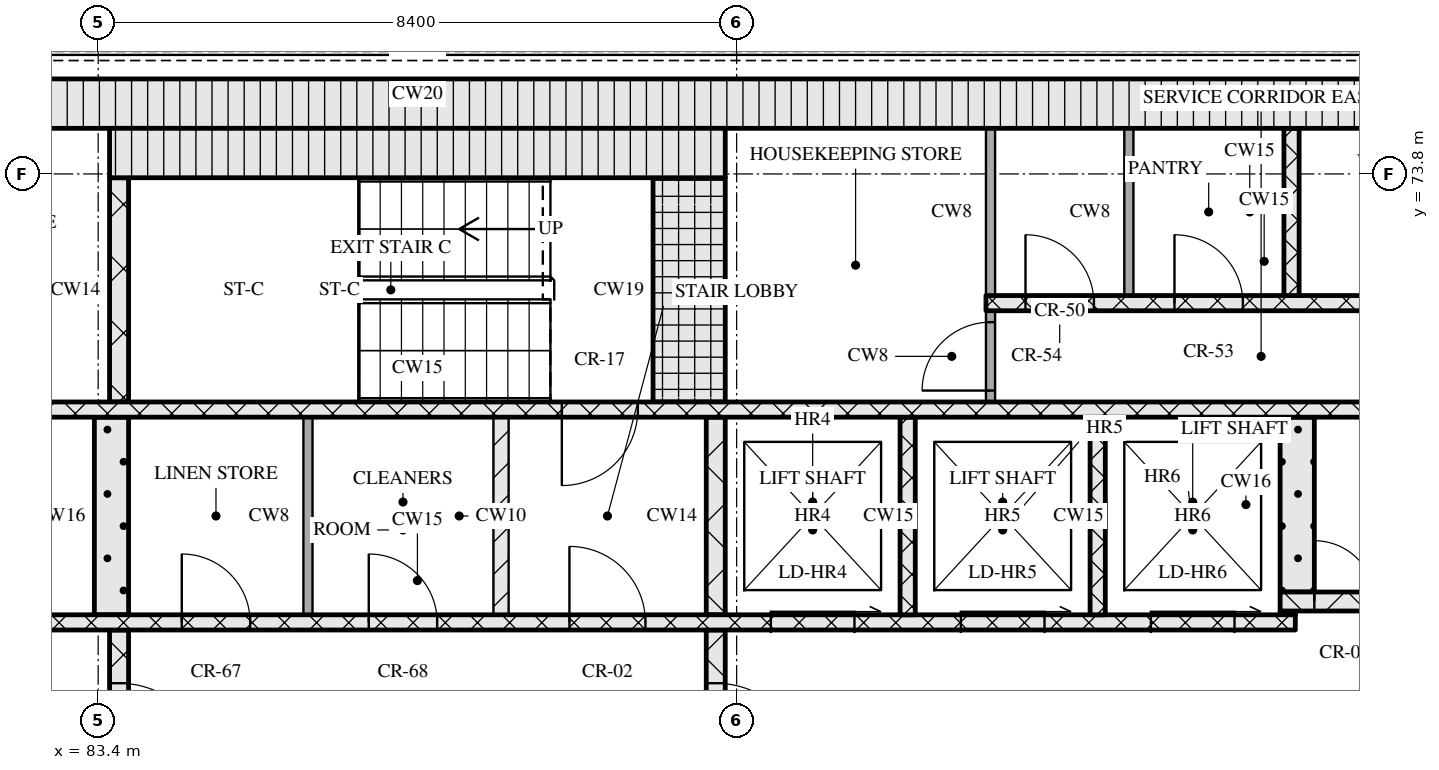
"""IFC4 building model, lengths in metres.
Left out: names, types, materials, properties, quantities, classifications, styles, units other than length and angle.
Written with IfcOpenShell. Run it as: python <this file> out.ifc"""

import sys

from ifc_helpers import new_model, si_unit, direction, frame, frame_2d, origin, place, context, subcontext, project, spatial, rectangle, extrude, element, fill, save


model = new_model("IFC4")
c1 = context("Model", 3, precision=1e-05, world=origin(), true_north=direction((0.0, 1.0)))
c2 = subcontext(c1, "Body", "Model", "MODEL_VIEW")
j1 = project(units=[si_unit("LENGTHUNIT", "METRE"), si_unit("PLANEANGLEUNIT", "RADIAN")], contexts=[c1])
p1 = place(None, origin())
s1 = spatial("IfcSite", under=j1, at=p1, CompositionType="ELEMENT")
p2 = place(p1, origin())
s2 = spatial("IfcBuilding", under=s1, at=p2, CompositionType="ELEMENT")
p3 = place(p2, frame((0.0, 0.0, 230.7)))
s3 = spatial("IfcBuildingStorey", under=s2, at=p3, CompositionType="ELEMENT", Elevation=230.7)
p4 = place(p3, frame((67.15, 74.725, 0.0), z_axis=(0.0, 0.0, 1.0), x_axis=(1.0, 0.0, 0.0)))
e1 = element("IfcWall", 1, at=p4, inside=s3, PredefinedType="SOLIDWALL", context=c2, shape_type="SweptSolid", body=[
    extrude(rectangle(XDim=40.9, YDim=0.65, at=frame_2d((20.45, 0.0))), origin(), (0.0, 0.0, 1.0), 3.32),
])
p5 = place(p3, frame((83.675, 65.2, 0.0), z_axis=(0.0, 0.0, 1.0), x_axis=(0.0, 1.0, 0.0)))
e2 = element("IfcWall", 2, at=p5, inside=s3, PredefinedType="SOLIDWALL", context=c2, shape_type="SweptSolid", body=[
    extrude(rectangle(XDim=2.6, YDim=0.25, at=frame_2d((1.3, 0.0))), origin(), (0.0, 0.0, 1.0), 3.32),
])
p6 = place(p5, frame((0.7, 0.0, 0.0)))
e3 = element("IfcOpeningElement", 3, at=p6, cuts=e2, PredefinedType="OPENING", context=c2, shape_type="SweptSolid", body=[
    extrude(rectangle(XDim=1.2, YDim=2.1, at=frame_2d((0.6, 1.05))), frame((0.0, 0.135, 0.0), z_axis=(0.0, -1.0, 0.0), x_axis=(1.0, 0.0, 0.0)), (0.0, 0.0, 1.0), 0.27),
])
p7 = place(p3, frame((91.525, 65.2, 0.0), z_axis=(0.0, 0.0, 1.0), x_axis=(0.0, 1.0, 0.0)))
e4 = element("IfcWall", 4, at=p7, inside=s3, PredefinedType="SOLIDWALL", context=c2, shape_type="SweptSolid", body=[
    extrude(rectangle(XDim=2.6, YDim=0.25, at=frame_2d((1.3, 0.0))), origin(), (0.0, 0.0, 1.0), 3.32),
])
p8 = place(p7, frame((0.7, 0.0, 0.0)))
e5 = element("IfcOpeningElement", 5, at=p8, cuts=e4, PredefinedType="OPENING", context=c2, shape_type="SweptSolid", body=[
    extrude(rectangle(XDim=1.2, YDim=2.1, at=frame_2d((0.6, 1.05))), frame((0.0, 0.135, 0.0), z_axis=(0.0, -1.0, 0.0), x_axis=(1.0, 0.0, 0.0)), (0.0, 0.0, 1.0), 0.27),
])
p9 = place(p3, frame((76.05, 67.9, 0.0), z_axis=(0.0, 0.0, 1.0), x_axis=(1.0, 0.0, 0.0)))
e6 = element("IfcWall", 6, at=p9, inside=s3, PredefinedType="SOLIDWALL", context=c2, shape_type="SweptSolid", body=[
    extrude(rectangle(XDim=23.1, YDim=0.2, at=frame_2d((11.55, 0.0))), origin(), (0.0, 0.0, 1.0), 3.32),
])
p10 = place(p9, frame((1.35, 0.0, 0.0)))
e7 = element("IfcOpeningElement", 7, at=p10, cuts=e6, PredefinedType="OPENING", context=c2, shape_type="SweptSolid", body=[
    extrude(rectangle(XDim=0.9, YDim=2.1, at=frame_2d((0.45, 1.05))), frame((0.0, 0.11, 0.0), z_axis=(0.0, -1.0, 0.0), x_axis=(1.0, 0.0, 0.0)), (0.0, 0.0, 1.0), 0.22),
])
p11 = place(p9, frame((5.06, 0.0, 0.0)))
e8 = element("IfcOpeningElement", 8, at=p11, cuts=e6, PredefinedType="OPENING", context=c2, shape_type="SweptSolid", body=[
    extrude(rectangle(XDim=0.9, YDim=2.1, at=frame_2d((0.45, 1.05))), frame((0.0, 0.11, 0.0), z_axis=(0.0, -1.0, 0.0), x_axis=(1.0, 0.0, 0.0)), (0.0, 0.0, 1.0), 0.22),
])
p12 = place(p9, frame((8.45, 0.0, 0.0)))
e9 = element("IfcOpeningElement", 9, at=p12, cuts=e6, PredefinedType="OPENING", context=c2, shape_type="SweptSolid", body=[
    extrude(rectangle(XDim=0.9, YDim=2.1, at=frame_2d((0.45, 1.05))), frame((0.0, 0.11, 0.0), z_axis=(0.0, -1.0, 0.0), x_axis=(1.0, 0.0, 0.0)), (0.0, 0.0, 1.0), 0.22),
])
p13 = place(p9, frame((10.91, 0.0, 0.0)))
e10 = element("IfcOpeningElement", 10, at=p13, cuts=e6, PredefinedType="OPENING", context=c2, shape_type="SweptSolid", body=[
    extrude(rectangle(XDim=0.9, YDim=2.1, at=frame_2d((0.45, 1.05))), frame((0.0, 0.11, 0.0), z_axis=(0.0, -1.0, 0.0), x_axis=(1.0, 0.0, 0.0)), (0.0, 0.0, 1.0), 0.22),
])
p14 = place(p9, frame((13.55, 0.0, 0.0)))
e11 = element("IfcOpeningElement", 11, at=p14, cuts=e6, PredefinedType="OPENING", context=c2, shape_type="SweptSolid", body=[
    extrude(rectangle(XDim=1.0, YDim=2.1, at=frame_2d((0.5, 1.05))), frame((0.0, 0.11, 0.0), z_axis=(0.0, -1.0, 0.0), x_axis=(1.0, 0.0, 0.0)), (0.0, 0.0, 1.0), 0.22),
])
p15 = place(p9, frame((16.2, 0.0, 0.0)))
e12 = element("IfcOpeningElement", 12, at=p15, cuts=e6, PredefinedType="OPENING", context=c2, shape_type="SweptSolid", body=[
    extrude(rectangle(XDim=1.1, YDim=2.1, at=frame_2d((0.55, 1.05))), frame((0.0, 0.11, 0.0), z_axis=(0.0, -1.0, 0.0), x_axis=(1.0, 0.0, 0.0)), (0.0, 0.0, 1.0), 0.22),
])
p16 = place(p9, frame((18.7, 0.0, 0.0)))
e13 = element("IfcOpeningElement", 13, at=p16, cuts=e6, PredefinedType="OPENING", context=c2, shape_type="SweptSolid", body=[
    extrude(rectangle(XDim=1.1, YDim=2.1, at=frame_2d((0.55, 1.05))), frame((0.0, 0.11, 0.0), z_axis=(0.0, -1.0, 0.0), x_axis=(1.0, 0.0, 0.0)), (0.0, 0.0, 1.0), 0.22),
])
p17 = place(p9, frame((21.2, 0.0, 0.0)))
e14 = element("IfcOpeningElement", 14, at=p17, cuts=e6, PredefinedType="OPENING", context=c2, shape_type="SweptSolid", body=[
    extrude(rectangle(XDim=1.1, YDim=2.1, at=frame_2d((0.55, 1.05))), frame((0.0, 0.11, 0.0), z_axis=(0.0, -1.0, 0.0), x_axis=(1.0, 0.0, 0.0)), (0.0, 0.0, 1.0), 0.22),
])
p18 = place(p3, frame((83.575, 68.0, 0.0), z_axis=(0.0, 0.0, 1.0), x_axis=(0.0, 1.0, 0.0)))
e15 = element("IfcWall", 15, at=p18, inside=s3, PredefinedType="SOLIDWALL", context=c2, shape_type="SweptSolid", body=[
    extrude(rectangle(XDim=2.6, YDim=0.45, at=frame_2d((1.3, 0.0))), origin(), (0.0, 0.0, 1.0), 3.32),
])
p19 = place(p3, frame((86.16, 68.0, 0.0), z_axis=(0.0, 0.0, 1.0), x_axis=(0.0, 1.0, 0.0)))
e16 = element("IfcWall", 16, at=p19, inside=s3, PredefinedType="PARTITIONING", context=c2, shape_type="SweptSolid", body=[
    extrude(rectangle(XDim=2.6, YDim=0.12, at=frame_2d((1.3, 0.0))), origin(), (0.0, 0.0, 1.0), 3.32),
])
p20 = place(p3, frame((88.7, 68.0, 0.0), z_axis=(0.0, 0.0, 1.0), x_axis=(0.0, 1.0, 0.0)))
e17 = element("IfcWall", 17, at=p20, inside=s3, PredefinedType="PARTITIONING", context=c2, shape_type="SweptSolid", body=[
    extrude(rectangle(XDim=2.6, YDim=0.2, at=frame_2d((1.3, 0.0))), origin(), (0.0, 0.0, 1.0), 3.32),
])
p21 = place(p3, frame((91.525, 68.0, 0.0), z_axis=(0.0, 0.0, 1.0), x_axis=(0.0, 1.0, 0.0)))
e18 = element("IfcWall", 18, at=p21, inside=s3, PredefinedType="SOLIDWALL", context=c2, shape_type="SweptSolid", body=[
    extrude(rectangle(XDim=2.6, YDim=0.25, at=frame_2d((1.3, 0.0))), origin(), (0.0, 0.0, 1.0), 3.32),
])
for number, where, z_axis, x_axis in (
    (19, (94.05, 68.0, 0.0), (0.0, 0.0, 1.0), (0.0, 1.0, 0.0)),
    (20, (96.55, 68.0, 0.0), (0.0, 0.0, 1.0), (0.0, 1.0, 0.0)),
):
    element("IfcWall", number, at=place(p3, frame(where, z_axis=z_axis, x_axis=x_axis)), inside=s3, PredefinedType="SOLIDWALL", context=c2, shape_type="SweptSolid", body=[
        extrude(rectangle(XDim=2.6, YDim=0.2, at=frame_2d((1.3, 0.0))), origin(), (0.0, 0.0, 1.0), 3.32),
    ])
p22 = place(p3, frame((98.95, 68.025, 0.0), z_axis=(0.0, 0.0, 1.0), x_axis=(1.0, 0.0, 0.0)))
e21 = element("IfcWall", 21, at=p22, inside=s3, PredefinedType="SOLIDWALL", context=c2, shape_type="SweptSolid", body=[
    extrude(rectangle(XDim=0.2, YDim=0.05, at=frame_2d((0.1, 0.0))), origin(), (0.0, 0.0, 1.0), 3.32),
])
p23 = place(p3, frame((98.95, 68.175, 0.0), z_axis=(0.0, 0.0, 1.0), x_axis=(1.0, 0.0, 0.0)))
e22 = element("IfcWall", 22, at=p23, inside=s3, PredefinedType="SOLIDWALL", context=c2, shape_type="SweptSolid", body=[
    extrude(rectangle(XDim=8.45, YDim=0.25, at=frame_2d((4.225, 0.0))), origin(), (0.0, 0.0, 1.0), 3.32),
])
p24 = place(p23, frame((0.45, 0.0, 0.0)))
e23 = element("IfcOpeningElement", 23, at=p24, cuts=e22, PredefinedType="OPENING", context=c2, shape_type="SweptSolid", body=[
    extrude(rectangle(XDim=0.8, YDim=2.1, at=frame_2d((0.4, 1.05))), frame((0.0, 0.135, 0.0), z_axis=(0.0, -1.0, 0.0), x_axis=(1.0, 0.0, 0.0)), (0.0, 0.0, 1.0), 0.27),
])
p25 = place(p23, frame((1.75, 0.0, 0.0)))
e24 = element("IfcOpeningElement", 24, at=p25, cuts=e22, PredefinedType="OPENING", context=c2, shape_type="SweptSolid", body=[
    extrude(rectangle(XDim=1.0, YDim=2.1, at=frame_2d((0.5, 1.05))), frame((0.0, 0.135, 0.0), z_axis=(0.0, -1.0, 0.0), x_axis=(1.0, 0.0, 0.0)), (0.0, 0.0, 1.0), 0.27),
])
p26 = place(p3, frame((99.175, 68.3, 0.0), z_axis=(0.0, 0.0, 1.0), x_axis=(0.0, 1.0, 0.0)))
e25 = element("IfcWall", 25, at=p26, inside=s3, PredefinedType="SOLIDWALL", context=c2, shape_type="SweptSolid", body=[
    extrude(rectangle(XDim=2.3, YDim=0.45, at=frame_2d((1.15, 0.0))), origin(), (0.0, 0.0, 1.0), 3.32),
])
p27 = place(p3, frame((67.8, 70.7, 0.0), z_axis=(0.0, 0.0, 1.0), x_axis=(1.0, 0.0, 0.0)))
e26 = element("IfcWall", 26, at=p27, inside=s3, PredefinedType="SOLIDWALL", context=c2, shape_type="SweptSolid", body=[
    extrude(rectangle(XDim=39.6, YDim=0.2, at=frame_2d((19.8, 0.0))), origin(), (0.0, 0.0, 1.0), 3.32),
])
p28 = place(p27, frame((0.65, 0.0, 0.0)))
e27 = element("IfcOpeningElement", 27, at=p28, cuts=e26, PredefinedType="OPENING", context=c2, shape_type="SweptSolid", body=[
    extrude(rectangle(XDim=1.1, YDim=2.1, at=frame_2d((0.55, 1.05))), frame((0.0, 0.11, 0.0), z_axis=(0.0, -1.0, 0.0), x_axis=(1.0, 0.0, 0.0)), (0.0, 0.0, 1.0), 0.22),
])
p29 = place(p27, frame((3.25, 0.0, 0.0)))
e28 = element("IfcOpeningElement", 28, at=p29, cuts=e26, PredefinedType="OPENING", context=c2, shape_type="SweptSolid", body=[
    extrude(rectangle(XDim=1.1, YDim=2.1, at=frame_2d((0.55, 1.05))), frame((0.0, 0.11, 0.0), z_axis=(0.0, -1.0, 0.0), x_axis=(1.0, 0.0, 0.0)), (0.0, 0.0, 1.0), 0.22),
])
p30 = place(p27, frame((5.9, 0.0, 0.0)))
e29 = element("IfcOpeningElement", 29, at=p30, cuts=e26, PredefinedType="OPENING", context=c2, shape_type="SweptSolid", body=[
    extrude(rectangle(XDim=1.0, YDim=2.1, at=frame_2d((0.5, 1.05))), frame((0.0, 0.11, 0.0), z_axis=(0.0, -1.0, 0.0), x_axis=(1.0, 0.0, 0.0)), (0.0, 0.0, 1.0), 0.22),
])
p31 = place(p27, frame((21.7, 0.0, 0.0)))
e30 = element("IfcOpeningElement", 30, at=p31, cuts=e26, PredefinedType="OPENING", context=c2, shape_type="SweptSolid", body=[
    extrude(rectangle(XDim=1.0, YDim=2.1, at=frame_2d((0.5, 1.05))), frame((0.0, 0.11, 0.0), z_axis=(0.0, -1.0, 0.0), x_axis=(1.0, 0.0, 0.0)), (0.0, 0.0, 1.0), 0.22),
])
p32 = place(p27, frame((32.7, 0.0, 0.0)))
e31 = element("IfcOpeningElement", 31, at=p32, cuts=e26, PredefinedType="OPENING", context=c2, shape_type="SweptSolid", body=[
    extrude(rectangle(XDim=1.0, YDim=2.1, at=frame_2d((0.5, 1.05))), frame((0.0, 0.11, 0.0), z_axis=(0.0, -1.0, 0.0), x_axis=(1.0, 0.0, 0.0)), (0.0, 0.0, 1.0), 0.22),
])
p33 = place(p27, frame((35.25, 0.0, 0.0)))
e32 = element("IfcOpeningElement", 32, at=p33, cuts=e26, PredefinedType="OPENING", context=c2, shape_type="SweptSolid", body=[
    extrude(rectangle(XDim=1.1, YDim=2.1, at=frame_2d((0.55, 1.05))), frame((0.0, 0.11, 0.0), z_axis=(0.0, -1.0, 0.0), x_axis=(1.0, 0.0, 0.0)), (0.0, 0.0, 1.0), 0.22),
])
p34 = place(p27, frame((37.85, 0.0, 0.0)))
e33 = element("IfcOpeningElement", 33, at=p34, cuts=e26, PredefinedType="OPENING", context=c2, shape_type="SweptSolid", body=[
    extrude(rectangle(XDim=1.1, YDim=2.1, at=frame_2d((0.55, 1.05))), frame((0.0, 0.11, 0.0), z_axis=(0.0, -1.0, 0.0), x_axis=(1.0, 0.0, 0.0)), (0.0, 0.0, 1.0), 0.22),
])
p35 = place(p3, frame((83.675, 70.8, 0.0), z_axis=(0.0, 0.0, 1.0), x_axis=(0.0, 1.0, 0.0)))
e34 = element("IfcWall", 34, at=p35, inside=s3, PredefinedType="SOLIDWALL", context=c2, shape_type="SweptSolid", body=[
    extrude(rectangle(XDim=2.95, YDim=0.25, at=frame_2d((1.475, 0.0))), origin(), (0.0, 0.0, 1.0), 3.32),
])
p36 = place(p3, frame((91.175, 70.8, 0.0), z_axis=(0.0, 0.0, 1.0), x_axis=(0.0, 1.0, 0.0)))
e35 = element("IfcWall", 35, at=p36, inside=s3, PredefinedType="SOLIDWALL", context=c2, shape_type="SweptSolid", body=[
    extrude(rectangle(XDim=2.95, YDim=0.95, at=frame_2d((1.475, 0.0))), origin(), (0.0, 0.0, 1.0), 3.32),
])
p37 = place(p3, frame((95.14, 70.8, 0.0), z_axis=(0.0, 0.0, 1.0), x_axis=(0.0, 1.0, 0.0)))
e36 = element("IfcWall", 36, at=p37, inside=s3, PredefinedType="PARTITIONING", context=c2, shape_type="SweptSolid", body=[
    extrude(rectangle(XDim=1.2, YDim=0.12, at=frame_2d((0.6, 0.0))), origin(), (0.0, 0.0, 1.0), 3.32),
])
p38 = place(p37, frame((0.15, 0.0, 0.0)))
e37 = element("IfcOpeningElement", 37, at=p38, cuts=e36, PredefinedType="OPENING", context=c2, shape_type="SweptSolid", body=[
    extrude(rectangle(XDim=0.9, YDim=2.1, at=frame_2d((0.45, 1.05))), frame((0.0, 0.07, 0.0), z_axis=(0.0, -1.0, 0.0), x_axis=(1.0, 0.0, 0.0)), (0.0, 0.0, 1.0), 0.14),
])
p39 = place(p3, frame((95.08, 72.1, 0.0), z_axis=(0.0, 0.0, 1.0), x_axis=(1.0, 0.0, 0.0)))
e38 = element("IfcWall", 38, at=p39, inside=s3, PredefinedType="SOLIDWALL", context=c2, shape_type="SweptSolid", body=[
    extrude(rectangle(XDim=7.32, YDim=0.2, at=frame_2d((3.66, 0.0))), origin(), (0.0, 0.0, 1.0), 3.32),
])
p40 = place(p39, frame((0.52, 0.0, 0.0)))
e39 = element("IfcOpeningElement", 39, at=p40, cuts=e38, PredefinedType="OPENING", context=c2, shape_type="SweptSolid", body=[
    extrude(rectangle(XDim=0.9, YDim=2.1, at=frame_2d((0.45, 1.05))), frame((0.0, 0.11, 0.0), z_axis=(0.0, -1.0, 0.0), x_axis=(1.0, 0.0, 0.0)), (0.0, 0.0, 1.0), 0.22),
])
p41 = place(p39, frame((2.48, 0.0, 0.0)))
e40 = element("IfcOpeningElement", 40, at=p41, cuts=e38, PredefinedType="OPENING", context=c2, shape_type="SweptSolid", body=[
    extrude(rectangle(XDim=0.9, YDim=2.1, at=frame_2d((0.45, 1.05))), frame((0.0, 0.11, 0.0), z_axis=(0.0, -1.0, 0.0), x_axis=(1.0, 0.0, 0.0)), (0.0, 0.0, 1.0), 0.22),
])
p42 = place(p39, frame((5.17, 0.0, 0.0)))
e41 = element("IfcOpeningElement", 41, at=p42, cuts=e38, PredefinedType="OPENING", context=c2, shape_type="SweptSolid", body=[
    extrude(rectangle(XDim=0.9, YDim=2.1, at=frame_2d((0.45, 1.05))), frame((0.0, 0.11, 0.0), z_axis=(0.0, -1.0, 0.0), x_axis=(1.0, 0.0, 0.0)), (0.0, 0.0, 1.0), 0.22),
])
for number, where, z_axis, x_axis in (
    (42, (95.14, 72.2, 0.0), (0.0, 0.0, 1.0), (0.0, 1.0, 0.0)),
    (43, (96.96, 72.2, 0.0), (0.0, 0.0, 1.0), (0.0, 1.0, 0.0)),
):
    element("IfcWall", number, at=place(p3, frame(where, z_axis=z_axis, x_axis=x_axis)), inside=s3, PredefinedType="PARTITIONING", context=c2, shape_type="SweptSolid", body=[
        extrude(rectangle(XDim=2.2, YDim=0.12, at=frame_2d((1.1, 0.0))), origin(), (0.0, 0.0, 1.0), 3.32),
    ])
p43 = place(p3, frame((99.1, 72.2, 0.0), z_axis=(0.0, 0.0, 1.0), x_axis=(0.0, 1.0, 0.0)))
e44 = element("IfcWall", 44, at=p43, inside=s3, PredefinedType="SOLIDWALL", context=c2, shape_type="SweptSolid", body=[
    extrude(rectangle(XDim=2.2, YDim=0.2, at=frame_2d((1.1, 0.0))), origin(), (0.0, 0.0, 1.0), 3.32),
])
p44 = place(p3, frame((83.55, 74.075, 0.0), z_axis=(0.0, 0.0, 1.0), x_axis=(1.0, 0.0, 0.0)))
e45 = element("IfcWall", 45, at=p44, inside=s3, PredefinedType="SOLIDWALL", context=c2, shape_type="SweptSolid", body=[
    extrude(rectangle(XDim=8.1, YDim=0.65, at=frame_2d((4.05, 0.0))), origin(), (0.0, 0.0, 1.0), 3.32),
])
p45 = place(p6, origin())
e46 = element("IfcDoor", 46, at=p45, inside=s3, OperationType="SINGLE_SWING_RIGHT", PredefinedType="DOOR", context=c2, shape_type="SweptSolid", body=[
    extrude(rectangle(XDim=1.2, YDim=2.1, at=frame_2d((0.6, 1.05))), frame((0.0, 0.025, 0.0), z_axis=(0.0, -1.0, 0.0), x_axis=(1.0, 0.0, 0.0)), (0.0, 0.0, 1.0), 0.05),
])
fill(e3, e46)
p46 = place(p8, origin())
e47 = element("IfcDoor", 47, at=p46, inside=s3, OperationType="SINGLE_SWING_RIGHT", PredefinedType="DOOR", context=c2, shape_type="SweptSolid", body=[
    extrude(rectangle(XDim=1.2, YDim=2.1, at=frame_2d((0.6, 1.05))), frame((0.0, 0.025, 0.0), z_axis=(0.0, -1.0, 0.0), x_axis=(1.0, 0.0, 0.0)), (0.0, 0.0, 1.0), 0.05),
])
fill(e5, e47)
p47 = place(p12, origin())
e48 = element("IfcDoor", 48, at=p47, inside=s3, OperationType="SINGLE_SWING_LEFT", PredefinedType="DOOR", context=c2, shape_type="SweptSolid", body=[
    extrude(rectangle(XDim=0.9, YDim=2.1, at=frame_2d((0.45, 1.05))), frame((0.0, 0.025, 0.0), z_axis=(0.0, -1.0, 0.0), x_axis=(1.0, 0.0, 0.0)), (0.0, 0.0, 1.0), 0.05),
])
fill(e9, e48)
p48 = place(p13, origin())
e49 = element("IfcDoor", 49, at=p48, inside=s3, OperationType="SINGLE_SWING_LEFT", PredefinedType="DOOR", context=c2, shape_type="SweptSolid", body=[
    extrude(rectangle(XDim=0.9, YDim=2.1, at=frame_2d((0.45, 1.05))), frame((0.0, 0.025, 0.0), z_axis=(0.0, -1.0, 0.0), x_axis=(1.0, 0.0, 0.0)), (0.0, 0.0, 1.0), 0.05),
])
fill(e10, e49)
p49 = place(p14, origin())
e50 = element("IfcDoor", 50, at=p49, inside=s3, OperationType="SINGLE_SWING_LEFT", PredefinedType="DOOR", context=c2, shape_type="SweptSolid", body=[
    extrude(rectangle(XDim=1.0, YDim=2.1, at=frame_2d((0.5, 1.05))), frame((0.0, 0.025, 0.0), z_axis=(0.0, -1.0, 0.0), x_axis=(1.0, 0.0, 0.0)), (0.0, 0.0, 1.0), 0.05),
])
fill(e11, e50)
p50 = place(p15, origin())
e51 = element("IfcDoor", 51, at=p50, inside=s3, OperationType="SLIDING_TO_RIGHT", PredefinedType="DOOR", context=c2, shape_type="SweptSolid", body=[
    extrude(rectangle(XDim=1.1, YDim=2.1, at=frame_2d((0.55, 1.05))), frame((0.0, 0.025, 0.0), z_axis=(0.0, -1.0, 0.0), x_axis=(1.0, 0.0, 0.0)), (0.0, 0.0, 1.0), 0.05),
])
fill(e12, e51)
p51 = place(p16, origin())
e52 = element("IfcDoor", 52, at=p51, inside=s3, OperationType="SLIDING_TO_RIGHT", PredefinedType="DOOR", context=c2, shape_type="SweptSolid", body=[
    extrude(rectangle(XDim=1.1, YDim=2.1, at=frame_2d((0.55, 1.05))), frame((0.0, 0.025, 0.0), z_axis=(0.0, -1.0, 0.0), x_axis=(1.0, 0.0, 0.0)), (0.0, 0.0, 1.0), 0.05),
])
fill(e13, e52)
p52 = place(p17, origin())
e53 = element("IfcDoor", 53, at=p52, inside=s3, OperationType="SLIDING_TO_RIGHT", PredefinedType="DOOR", context=c2, shape_type="SweptSolid", body=[
    extrude(rectangle(XDim=1.1, YDim=2.1, at=frame_2d((0.55, 1.05))), frame((0.0, 0.025, 0.0), z_axis=(0.0, -1.0, 0.0), x_axis=(1.0, 0.0, 0.0)), (0.0, 0.0, 1.0), 0.05),
])
fill(e14, e53)
p53 = place(p24, origin())
e54 = element("IfcDoor", 54, at=p53, inside=s3, OperationType="SINGLE_SWING_LEFT", PredefinedType="DOOR", context=c2, shape_type="SweptSolid", body=[
    extrude(rectangle(XDim=0.8, YDim=2.1, at=frame_2d((0.4, 1.05))), frame((0.0, 0.025, 0.0), z_axis=(0.0, -1.0, 0.0), x_axis=(1.0, 0.0, 0.0)), (0.0, 0.0, 1.0), 0.05),
])
fill(e23, e54)
p54 = place(p31, origin())
e55 = element("IfcDoor", 55, at=p54, inside=s3, OperationType="SINGLE_SWING_RIGHT", PredefinedType="DOOR", context=c2, shape_type="SweptSolid", body=[
    extrude(rectangle(XDim=1.0, YDim=2.1, at=frame_2d((0.5, 1.05))), frame((0.0, 0.025, 0.0), z_axis=(0.0, -1.0, 0.0), x_axis=(1.0, 0.0, 0.0)), (0.0, 0.0, 1.0), 0.05),
])
fill(e30, e55)
p55 = place(p38, origin())
e56 = element("IfcDoor", 56, at=p55, inside=s3, OperationType="SINGLE_SWING_LEFT", PredefinedType="DOOR", context=c2, shape_type="SweptSolid", body=[
    extrude(rectangle(XDim=0.9, YDim=2.1, at=frame_2d((0.45, 1.05))), frame((0.0, 0.025, 0.0), z_axis=(0.0, -1.0, 0.0), x_axis=(1.0, 0.0, 0.0)), (0.0, 0.0, 1.0), 0.05),
])
fill(e37, e56)
p56 = place(p40, origin())
e57 = element("IfcDoor", 57, at=p56, inside=s3, OperationType="SINGLE_SWING_LEFT", PredefinedType="DOOR", context=c2, shape_type="SweptSolid", body=[
    extrude(rectangle(XDim=0.9, YDim=2.1, at=frame_2d((0.45, 1.05))), frame((0.0, 0.025, 0.0), z_axis=(0.0, -1.0, 0.0), x_axis=(1.0, 0.0, 0.0)), (0.0, 0.0, 1.0), 0.05),
])
fill(e39, e57)
p57 = place(p41, origin())
e58 = element("IfcDoor", 58, at=p57, inside=s3, OperationType="SINGLE_SWING_LEFT", PredefinedType="DOOR", context=c2, shape_type="SweptSolid", body=[
    extrude(rectangle(XDim=0.9, YDim=2.1, at=frame_2d((0.45, 1.05))), frame((0.0, 0.025, 0.0), z_axis=(0.0, -1.0, 0.0), x_axis=(1.0, 0.0, 0.0)), (0.0, 0.0, 1.0), 0.05),
])
fill(e40, e58)
save(model, sys.argv[1])
